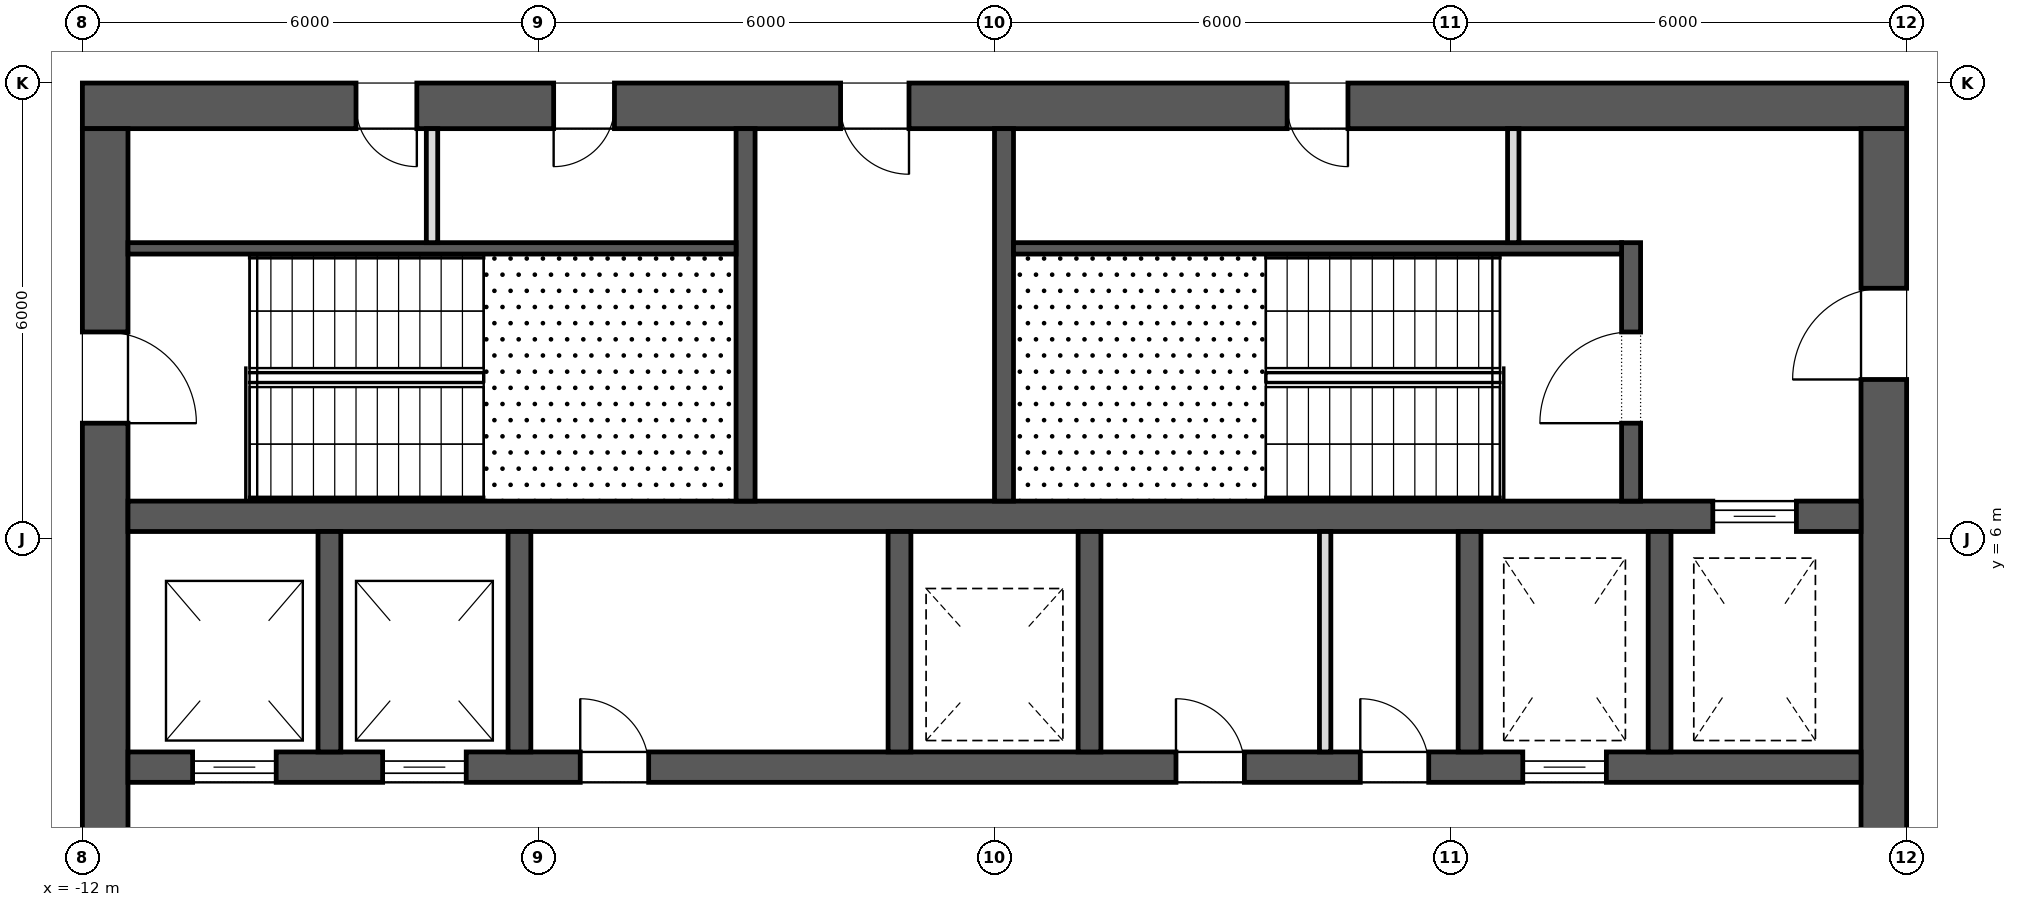
"""IFC4 building model, lengths in metres.
Left out: names, types, materials, properties, quantities, classifications, styles, units other than length and angle.
Written with IfcOpenShell. Run it as: python <this file> out.ifc"""

import sys

from ifc_helpers import new_model, si_unit, direction, frame, frame_2d, origin, place, context, subcontext, project, spatial, rectangle, extrude, element, fill, save


model = new_model("IFC4")
c1 = context("Model", 3, precision=1e-05, world=origin(), true_north=direction((0.0, 1.0)))
c2 = subcontext(c1, "Body", "Model", "MODEL_VIEW")
j1 = project(units=[si_unit("LENGTHUNIT", "METRE"), si_unit("PLANEANGLEUNIT", "RADIAN")], contexts=[c1])
p1 = place(None, origin())
s1 = spatial("IfcSite", under=j1, at=p1, CompositionType="ELEMENT")
p2 = place(p1, origin())
s2 = spatial("IfcBuilding", under=s1, at=p2, CompositionType="ELEMENT")
p3 = place(p2, frame((0.0, 0.0, 324.3)))
s3 = spatial("IfcBuildingStorey", under=s2, at=p3, CompositionType="ELEMENT", Elevation=324.3)
p4 = place(p3, frame((-12.0, 11.7, 0.0), z_axis=(0.0, 0.0, 1.0), x_axis=(1.0, 0.0, 0.0)))
e1 = element("IfcWall", 1, at=p4, inside=s3, PredefinedType="SHEAR", context=c2, shape_type="SweptSolid", body=[
    extrude(rectangle(XDim=24.0, YDim=0.6, at=frame_2d((12.0, 0.0))), origin(), (0.0, 0.0, 1.0), 4.0),
])
p5 = place(p4, frame((9.975, 0.0, 0.0)))
e2 = element("IfcOpeningElement", 2, at=p5, cuts=e1, PredefinedType="OPENING", context=c2, shape_type="SweptSolid", body=[
    extrude(rectangle(XDim=0.9, YDim=2.1, at=frame_2d((0.45, 1.05))), frame((0.0, 0.312, 0.0), z_axis=(0.0, -1.0, 0.0), x_axis=(1.0, 0.0, 0.0)), (0.0, 0.0, 1.0), 0.624),
])
p6 = place(p4, frame((3.6, 0.0, 0.0)))
e3 = element("IfcOpeningElement", 3, at=p6, cuts=e1, PredefinedType="OPENING", context=c2, shape_type="SweptSolid", body=[
    extrude(rectangle(XDim=0.8, YDim=2.1, at=frame_2d((0.4, 1.05))), frame((0.0, 0.312, 0.0), z_axis=(0.0, -1.0, 0.0), x_axis=(1.0, 0.0, 0.0)), (0.0, 0.0, 1.0), 0.624),
])
p7 = place(p4, frame((6.2, 0.0, 0.0)))
e4 = element("IfcOpeningElement", 4, at=p7, cuts=e1, PredefinedType="OPENING", context=c2, shape_type="SweptSolid", body=[
    extrude(rectangle(XDim=0.8, YDim=2.1, at=frame_2d((0.4, 1.05))), frame((0.0, 0.312, 0.0), z_axis=(0.0, -1.0, 0.0), x_axis=(1.0, 0.0, 0.0)), (0.0, 0.0, 1.0), 0.624),
])
p8 = place(p4, frame((15.85, 0.0, 0.0)))
e5 = element("IfcOpeningElement", 5, at=p8, cuts=e1, PredefinedType="OPENING", context=c2, shape_type="SweptSolid", body=[
    extrude(rectangle(XDim=0.8, YDim=2.1, at=frame_2d((0.4, 1.05))), frame((0.0, 0.312, 0.0), z_axis=(0.0, -1.0, 0.0), x_axis=(1.0, 0.0, 0.0)), (0.0, 0.0, 1.0), 0.624),
])
p9 = place(p3, frame((11.7, -11.4, 0.0), z_axis=(0.0, 0.0, 1.0), x_axis=(0.0, 1.0, 0.0)))
e6 = element("IfcWall", 6, at=p9, inside=s3, PredefinedType="SHEAR", context=c2, shape_type="SweptSolid", body=[
    extrude(rectangle(XDim=22.8, YDim=0.6, at=frame_2d((11.4, 0.0))), origin(), (0.0, 0.0, 1.0), 4.0),
])
p10 = place(p9, frame((10.2, 0.0, 0.0)))
e7 = element("IfcOpeningElement", 7, at=p10, cuts=e6, PredefinedType="OPENING", context=c2, shape_type="SweptSolid", body=[
    extrude(rectangle(XDim=2.4, YDim=2.1, at=frame_2d((1.2, 1.05))), frame((0.0, 0.312, 0.0), z_axis=(0.0, -1.0, 0.0), x_axis=(1.0, 0.0, 0.0)), (0.0, 0.0, 1.0), 0.624),
])
p11 = place(p9, frame((19.5, 0.0, 0.0)))
e8 = element("IfcOpeningElement", 8, at=p11, cuts=e6, PredefinedType="OPENING", context=c2, shape_type="SweptSolid", body=[
    extrude(rectangle(XDim=1.2, YDim=2.1, at=frame_2d((0.6, 1.05))), frame((0.0, 0.312, 0.0), z_axis=(0.0, -1.0, 0.0), x_axis=(1.0, 0.0, 0.0)), (0.0, 0.0, 1.0), 0.624),
])
p12 = place(p9, frame((2.1, 0.0, 0.0)))
e9 = element("IfcOpeningElement", 9, at=p12, cuts=e6, PredefinedType="OPENING", context=c2, shape_type="SweptSolid", body=[
    extrude(rectangle(XDim=1.2, YDim=2.1, at=frame_2d((0.6, 1.05))), frame((0.0, 0.312, 0.0), z_axis=(0.0, -1.0, 0.0), x_axis=(1.0, 0.0, 0.0)), (0.0, 0.0, 1.0), 0.624),
])
p13 = place(p3, frame((-11.7, -11.4, 0.0), z_axis=(0.0, 0.0, 1.0), x_axis=(0.0, 1.0, 0.0)))
e10 = element("IfcWall", 10, at=p13, inside=s3, PredefinedType="SHEAR", context=c2, shape_type="SweptSolid", body=[
    extrude(rectangle(XDim=22.8, YDim=0.6, at=frame_2d((11.4, 0.0))), origin(), (0.0, 0.0, 1.0), 4.0),
])
p14 = place(p13, frame((10.2, 0.0, 0.0)))
e11 = element("IfcOpeningElement", 11, at=p14, cuts=e10, PredefinedType="OPENING", context=c2, shape_type="SweptSolid", body=[
    extrude(rectangle(XDim=2.4, YDim=2.1, at=frame_2d((1.2, 1.05))), frame((0.0, 0.312, 0.0), z_axis=(0.0, -1.0, 0.0), x_axis=(1.0, 0.0, 0.0)), (0.0, 0.0, 1.0), 0.624),
])
p15 = place(p13, frame((18.925, 0.0, 0.0)))
e12 = element("IfcOpeningElement", 12, at=p15, cuts=e10, PredefinedType="OPENING", context=c2, shape_type="SweptSolid", body=[
    extrude(rectangle(XDim=1.2, YDim=2.1, at=frame_2d((0.6, 1.05))), frame((0.0, 0.312, 0.0), z_axis=(0.0, -1.0, 0.0), x_axis=(1.0, 0.0, 0.0)), (0.0, 0.0, 1.0), 0.624),
])
p16 = place(p13, frame((2.675, 0.0, 0.0)))
e13 = element("IfcOpeningElement", 13, at=p16, cuts=e10, PredefinedType="OPENING", context=c2, shape_type="SweptSolid", body=[
    extrude(rectangle(XDim=1.2, YDim=2.1, at=frame_2d((0.6, 1.05))), frame((0.0, 0.312, 0.0), z_axis=(0.0, -1.0, 0.0), x_axis=(1.0, 0.0, 0.0)), (0.0, 0.0, 1.0), 0.624),
])
p17 = place(p3, frame((-11.4, 3.0, 0.0), z_axis=(0.0, 0.0, 1.0), x_axis=(1.0, 0.0, 0.0)))
e14 = element("IfcWall", 14, at=p17, inside=s3, PredefinedType="SHEAR", context=c2, shape_type="SweptSolid", body=[
    extrude(rectangle(XDim=22.8, YDim=0.4, at=frame_2d((11.4, 0.0))), origin(), (0.0, 0.0, 1.0), 4.0),
])
p18 = place(p17, frame((0.85, 0.0, 0.0)))
e15 = element("IfcOpeningElement", 15, at=p18, cuts=e14, PredefinedType="OPENING", context=c2, shape_type="SweptSolid", body=[
    extrude(rectangle(XDim=1.1, YDim=2.1, at=frame_2d((0.55, 1.05))), frame((0.0, 0.212, 0.0), z_axis=(0.0, -1.0, 0.0), x_axis=(1.0, 0.0, 0.0)), (0.0, 0.0, 1.0), 0.424),
])
p19 = place(p17, frame((3.35, 0.0, 0.0)))
e16 = element("IfcOpeningElement", 16, at=p19, cuts=e14, PredefinedType="OPENING", context=c2, shape_type="SweptSolid", body=[
    extrude(rectangle(XDim=1.1, YDim=2.1, at=frame_2d((0.55, 1.05))), frame((0.0, 0.212, 0.0), z_axis=(0.0, -1.0, 0.0), x_axis=(1.0, 0.0, 0.0)), (0.0, 0.0, 1.0), 0.424),
])
p20 = place(p17, frame((18.35, 0.0, 0.0)))
e17 = element("IfcOpeningElement", 17, at=p20, cuts=e14, PredefinedType="OPENING", context=c2, shape_type="SweptSolid", body=[
    extrude(rectangle(XDim=1.1, YDim=2.1, at=frame_2d((0.55, 1.05))), frame((0.0, 0.212, 0.0), z_axis=(0.0, -1.0, 0.0), x_axis=(1.0, 0.0, 0.0)), (0.0, 0.0, 1.0), 0.424),
])
p21 = place(p17, frame((13.788, 0.0, 0.0)))
e18 = element("IfcOpeningElement", 18, at=p21, cuts=e14, PredefinedType="OPENING", context=c2, shape_type="SweptSolid", body=[
    extrude(rectangle(XDim=0.9, YDim=2.1, at=frame_2d((0.45, 1.05))), frame((0.0, 0.212, 0.0), z_axis=(0.0, -1.0, 0.0), x_axis=(1.0, 0.0, 0.0)), (0.0, 0.0, 1.0), 0.424),
])
p22 = place(p17, frame((16.212, 0.0, 0.0)))
e19 = element("IfcOpeningElement", 19, at=p22, cuts=e14, PredefinedType="OPENING", context=c2, shape_type="SweptSolid", body=[
    extrude(rectangle(XDim=0.9, YDim=2.1, at=frame_2d((0.45, 1.05))), frame((0.0, 0.212, 0.0), z_axis=(0.0, -1.0, 0.0), x_axis=(1.0, 0.0, 0.0)), (0.0, 0.0, 1.0), 0.424),
])
p23 = place(p17, frame((5.95, 0.0, 0.0)))
e20 = element("IfcOpeningElement", 20, at=p23, cuts=e14, PredefinedType="OPENING", context=c2, shape_type="SweptSolid", body=[
    extrude(rectangle(XDim=0.9, YDim=2.1, at=frame_2d((0.45, 1.05))), frame((0.0, 0.212, 0.0), z_axis=(0.0, -1.0, 0.0), x_axis=(1.0, 0.0, 0.0)), (0.0, 0.0, 1.0), 0.424),
])
p24 = place(p3, frame((-11.4, 6.3, 0.0), z_axis=(0.0, 0.0, 1.0), x_axis=(1.0, 0.0, 0.0)))
e21 = element("IfcWall", 21, at=p24, inside=s3, PredefinedType="SHEAR", context=c2, shape_type="SweptSolid", body=[
    extrude(rectangle(XDim=22.8, YDim=0.4, at=frame_2d((11.4, 0.0))), origin(), (0.0, 0.0, 1.0), 4.0),
])
p25 = place(p24, frame((20.85, 0.0, 0.0)))
e22 = element("IfcOpeningElement", 22, at=p25, cuts=e21, PredefinedType="OPENING", context=c2, shape_type="SweptSolid", body=[
    extrude(rectangle(XDim=1.1, YDim=2.1, at=frame_2d((0.55, 1.05))), frame((0.0, 0.212, 0.0), z_axis=(0.0, -1.0, 0.0), x_axis=(1.0, 0.0, 0.0)), (0.0, 0.0, 1.0), 0.424),
])
for number, where, z_axis, x_axis in (
    (23, (-8.75, 3.2, 0.0), (0.0, 0.0, 1.0), (0.0, 1.0, 0.0)),
    (24, (-6.25, 3.2, 0.0), (0.0, 0.0, 1.0), (0.0, 1.0, 0.0)),
    (25, (-1.25, 3.2, 0.0), (0.0, 0.0, 1.0), (0.0, 1.0, 0.0)),
    (26, (1.25, 3.2, 0.0), (0.0, 0.0, 1.0), (0.0, 1.0, 0.0)),
    (27, (6.25, 3.2, 0.0), (0.0, 0.0, 1.0), (0.0, 1.0, 0.0)),
    (28, (8.75, 3.2, 0.0), (0.0, 0.0, 1.0), (0.0, 1.0, 0.0)),
):
    element("IfcWall", number, at=place(p3, frame(where, z_axis=z_axis, x_axis=x_axis)), inside=s3, PredefinedType="SHEAR", context=c2, shape_type="SweptSolid", body=[
        extrude(rectangle(XDim=2.9, YDim=0.3, at=frame_2d((1.45, 0.0))), origin(), (0.0, 0.0, 1.0), 4.0),
    ])
for number, where, z_axis, x_axis in (
    (29, (-3.275, 6.5, 0.0), (0.0, 0.0, 1.0), (0.0, 1.0, 0.0)),
    (30, (0.125, 6.5, 0.0), (0.0, 0.0, 1.0), (0.0, 1.0, 0.0)),
):
    element("IfcWall", number, at=place(p3, frame(where, z_axis=z_axis, x_axis=x_axis)), inside=s3, PredefinedType="SHEAR", context=c2, shape_type="SweptSolid", body=[
        extrude(rectangle(XDim=4.9, YDim=0.25, at=frame_2d((2.45, 0.0))), origin(), (0.0, 0.0, 1.0), 3.65),
    ])
p26 = place(p3, frame((8.375, 6.5, 0.0), z_axis=(0.0, 0.0, 1.0), x_axis=(0.0, 1.0, 0.0)))
e31 = element("IfcWall", 31, at=p26, inside=s3, PredefinedType="SHEAR", context=c2, shape_type="SweptSolid", body=[
    extrude(rectangle(XDim=3.4, YDim=0.25, at=frame_2d((1.7, 0.0))), origin(), (0.0, 0.0, 1.0), 3.65),
])
p27 = place(p26, frame((1.025, 0.0, 0.0)))
e32 = element("IfcOpeningElement", 32, at=p27, cuts=e31, PredefinedType="OPENING", context=c2, shape_type="SweptSolid", body=[
    extrude(rectangle(XDim=1.2, YDim=2.1, at=frame_2d((0.6, 1.05))), frame((0.0, 0.137, 0.0), z_axis=(0.0, -1.0, 0.0), x_axis=(1.0, 0.0, 0.0)), (0.0, 0.0, 1.0), 0.274),
])
for number, where, z_axis, x_axis in (
    (33, (-11.4, 9.825, 0.0), (0.0, 0.0, 1.0), (1.0, 0.0, 0.0)),
    (34, (0.25, 9.825, 0.0), (0.0, 0.0, 1.0), (1.0, 0.0, 0.0)),
):
    element("IfcWall", number, at=place(p3, frame(where, z_axis=z_axis, x_axis=x_axis)), inside=s3, PredefinedType="SHEAR", context=c2, shape_type="SweptSolid", body=[
        extrude(rectangle(XDim=8.0, YDim=0.15, at=frame_2d((4.0, 0.0))), origin(), (0.0, 0.0, 1.0), 3.65),
    ])
for number, where, z_axis, x_axis in (
    (35, (-7.4, 9.9, 0.0), (0.0, 0.0, 1.0), (0.0, 1.0, 0.0)),
    (36, (6.825, 9.9, 0.0), (0.0, 0.0, 1.0), (0.0, 1.0, 0.0)),
):
    element("IfcWall", number, at=place(p3, frame(where, z_axis=z_axis, x_axis=x_axis)), inside=s3, PredefinedType="PARTITIONING", context=c2, shape_type="SweptSolid", body=[
        extrude(rectangle(XDim=1.5, YDim=0.15, at=frame_2d((0.75, 0.0))), origin(), (0.0, 0.0, 1.0), 3.65),
    ])
p28 = place(p3, frame((4.35, 3.2, 0.0), z_axis=(0.0, 0.0, 1.0), x_axis=(0.0, 1.0, 0.0)))
e37 = element("IfcWall", 37, at=p28, inside=s3, PredefinedType="PARTITIONING", context=c2, shape_type="SweptSolid", body=[
    extrude(rectangle(XDim=2.9, YDim=0.15, at=frame_2d((1.45, 0.0))), origin(), (0.0, 0.0, 1.0), 3.65),
])
p29 = place(p25, origin())
e38 = element("IfcDoor", 38, at=p29, inside=s3, OperationType="SLIDING_TO_LEFT", PredefinedType="DOOR", context=c2, shape_type="SweptSolid", body=[
    extrude(rectangle(XDim=1.1, YDim=2.1, at=frame_2d((0.55, 1.05))), frame((0.0, 0.025, 0.0), z_axis=(0.0, -1.0, 0.0), x_axis=(1.0, 0.0, 0.0)), (0.0, 0.0, 1.0), 0.05),
])
fill(e22, e38)
p30 = place(p18, origin())
e39 = element("IfcDoor", 39, at=p30, inside=s3, OperationType="SLIDING_TO_LEFT", PredefinedType="DOOR", context=c2, shape_type="SweptSolid", body=[
    extrude(rectangle(XDim=1.1, YDim=2.1, at=frame_2d((0.55, 1.05))), frame((0.0, 0.025, 0.0), z_axis=(0.0, -1.0, 0.0), x_axis=(1.0, 0.0, 0.0)), (0.0, 0.0, 1.0), 0.05),
])
fill(e15, e39)
p31 = place(p19, origin())
e40 = element("IfcDoor", 40, at=p31, inside=s3, OperationType="SLIDING_TO_LEFT", PredefinedType="DOOR", context=c2, shape_type="SweptSolid", body=[
    extrude(rectangle(XDim=1.1, YDim=2.1, at=frame_2d((0.55, 1.05))), frame((0.0, 0.025, 0.0), z_axis=(0.0, -1.0, 0.0), x_axis=(1.0, 0.0, 0.0)), (0.0, 0.0, 1.0), 0.05),
])
fill(e16, e40)
p32 = place(p20, origin())
e41 = element("IfcDoor", 41, at=p32, inside=s3, OperationType="SLIDING_TO_LEFT", PredefinedType="DOOR", context=c2, shape_type="SweptSolid", body=[
    extrude(rectangle(XDim=1.1, YDim=2.1, at=frame_2d((0.55, 1.05))), frame((0.0, 0.025, 0.0), z_axis=(0.0, -1.0, 0.0), x_axis=(1.0, 0.0, 0.0)), (0.0, 0.0, 1.0), 0.05),
])
fill(e17, e41)
p33 = place(p15, frame((1.2, 0.0, 0.0), z_axis=(0.0, 0.0, 1.0), x_axis=(-1.0, 0.0, 0.0)))
e42 = element("IfcDoor", 42, at=p33, inside=s3, OperationType="SINGLE_SWING_LEFT", PredefinedType="DOOR", context=c2, shape_type="SweptSolid", body=[
    extrude(rectangle(XDim=1.2, YDim=2.1, at=frame_2d((0.6, 1.05))), frame((0.0, 0.025, 0.0), z_axis=(0.0, -1.0, 0.0), x_axis=(1.0, 0.0, 0.0)), (0.0, 0.0, 1.0), 0.05),
])
fill(e12, e42)
p34 = place(p27, origin())
e43 = element("IfcDoor", 43, at=p34, inside=s3, OperationType="SINGLE_SWING_RIGHT", PredefinedType="DOOR", context=c2, shape_type="SweptSolid", body=[
    extrude(rectangle(XDim=1.2, YDim=2.1, at=frame_2d((0.6, 1.05))), frame((0.0, 0.025, 0.0), z_axis=(0.0, -1.0, 0.0), x_axis=(1.0, 0.0, 0.0)), (0.0, 0.0, 1.0), 0.05),
])
fill(e32, e43)
p35 = place(p11, origin())
e44 = element("IfcDoor", 44, at=p35, inside=s3, OperationType="SINGLE_SWING_RIGHT", PredefinedType="DOOR", context=c2, shape_type="SweptSolid", body=[
    extrude(rectangle(XDim=1.2, YDim=2.1, at=frame_2d((0.6, 1.05))), frame((0.0, 0.025, 0.0), z_axis=(0.0, -1.0, 0.0), x_axis=(1.0, 0.0, 0.0)), (0.0, 0.0, 1.0), 0.05),
])
fill(e8, e44)
p36 = place(p5, frame((0.9, 0.0, 0.0), z_axis=(0.0, 0.0, 1.0), x_axis=(-1.0, 0.0, 0.0)))
e45 = element("IfcDoor", 45, at=p36, inside=s3, OperationType="SINGLE_SWING_RIGHT", PredefinedType="DOOR", context=c2, shape_type="SweptSolid", body=[
    extrude(rectangle(XDim=0.9, YDim=2.1, at=frame_2d((0.45, 1.05))), frame((0.0, 0.025, 0.0), z_axis=(0.0, -1.0, 0.0), x_axis=(1.0, 0.0, 0.0)), (0.0, 0.0, 1.0), 0.05),
])
fill(e2, e45)
p37 = place(p6, frame((0.8, 0.0, 0.0), z_axis=(0.0, 0.0, 1.0), x_axis=(-1.0, 0.0, 0.0)))
e46 = element("IfcDoor", 46, at=p37, inside=s3, OperationType="SINGLE_SWING_RIGHT", PredefinedType="DOOR", context=c2, shape_type="SweptSolid", body=[
    extrude(rectangle(XDim=0.8, YDim=2.1, at=frame_2d((0.4, 1.05))), frame((0.0, 0.025, 0.0), z_axis=(0.0, -1.0, 0.0), x_axis=(1.0, 0.0, 0.0)), (0.0, 0.0, 1.0), 0.05),
])
fill(e3, e46)
p38 = place(p7, frame((0.8, 0.0, 0.0), z_axis=(0.0, 0.0, 1.0), x_axis=(-1.0, 0.0, 0.0)))
e47 = element("IfcDoor", 47, at=p38, inside=s3, OperationType="SINGLE_SWING_LEFT", PredefinedType="DOOR", context=c2, shape_type="SweptSolid", body=[
    extrude(rectangle(XDim=0.8, YDim=2.1, at=frame_2d((0.4, 1.05))), frame((0.0, 0.025, 0.0), z_axis=(0.0, -1.0, 0.0), x_axis=(1.0, 0.0, 0.0)), (0.0, 0.0, 1.0), 0.05),
])
fill(e4, e47)
p39 = place(p8, frame((0.8, 0.0, 0.0), z_axis=(0.0, 0.0, 1.0), x_axis=(-1.0, 0.0, 0.0)))
e48 = element("IfcDoor", 48, at=p39, inside=s3, OperationType="SINGLE_SWING_RIGHT", PredefinedType="DOOR", context=c2, shape_type="SweptSolid", body=[
    extrude(rectangle(XDim=0.8, YDim=2.1, at=frame_2d((0.4, 1.05))), frame((0.0, 0.025, 0.0), z_axis=(0.0, -1.0, 0.0), x_axis=(1.0, 0.0, 0.0)), (0.0, 0.0, 1.0), 0.05),
])
fill(e5, e48)
p40 = place(p21, origin())
e49 = element("IfcDoor", 49, at=p40, inside=s3, OperationType="SINGLE_SWING_RIGHT", PredefinedType="DOOR", context=c2, shape_type="SweptSolid", body=[
    extrude(rectangle(XDim=0.9, YDim=2.1, at=frame_2d((0.45, 1.05))), frame((0.0, 0.025, 0.0), z_axis=(0.0, -1.0, 0.0), x_axis=(1.0, 0.0, 0.0)), (0.0, 0.0, 1.0), 0.05),
])
fill(e18, e49)
p41 = place(p22, origin())
e50 = element("IfcDoor", 50, at=p41, inside=s3, OperationType="SINGLE_SWING_RIGHT", PredefinedType="DOOR", context=c2, shape_type="SweptSolid", body=[
    extrude(rectangle(XDim=0.9, YDim=2.1, at=frame_2d((0.45, 1.05))), frame((0.0, 0.025, 0.0), z_axis=(0.0, -1.0, 0.0), x_axis=(1.0, 0.0, 0.0)), (0.0, 0.0, 1.0), 0.05),
])
fill(e19, e50)
p42 = place(p23, origin())
e51 = element("IfcDoor", 51, at=p42, inside=s3, OperationType="SINGLE_SWING_RIGHT", PredefinedType="DOOR", context=c2, shape_type="SweptSolid", body=[
    extrude(rectangle(XDim=0.9, YDim=2.1, at=frame_2d((0.45, 1.05))), frame((0.0, 0.025, 0.0), z_axis=(0.0, -1.0, 0.0), x_axis=(1.0, 0.0, 0.0)), (0.0, 0.0, 1.0), 0.05),
])
fill(e20, e51)
save(model, sys.argv[1])
